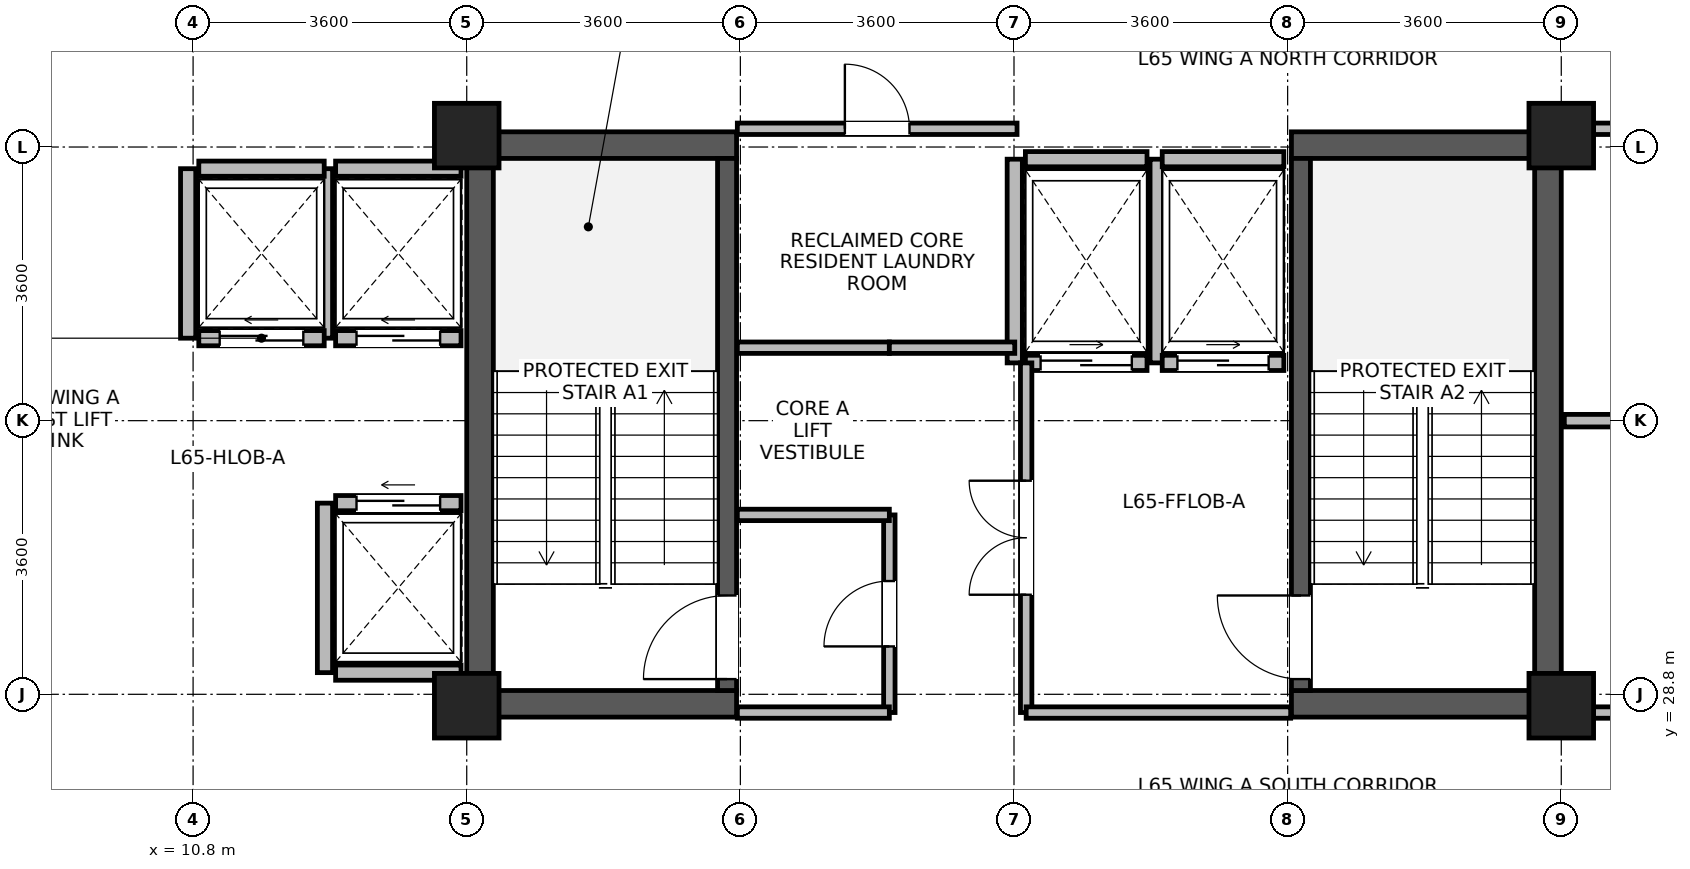
"""IFC4 building model, lengths in metres.
Left out: names, types, materials, properties, quantities, classifications, styles, units other than length and angle.
Written with IfcOpenShell. Run it as: python <this file> out.ifc"""

import sys

from ifc_helpers import new_model, si_unit, direction, frame, frame_2d, origin, origin_2d, place, context, subcontext, project, spatial, rectangle, extrude, source, transform, mapped, element, fill, save


model = new_model("IFC4")
c1 = context("Model", 3, precision=1e-05, world=origin(), true_north=direction((0.0, 1.0)))
c2 = subcontext(c1, "Body", "Model", "MODEL_VIEW")
j1 = project(units=[si_unit("LENGTHUNIT", "METRE"), si_unit("PLANEANGLEUNIT", "RADIAN")], contexts=[c1])
p1 = place(None, origin())
s1 = spatial("IfcSite", under=j1, at=p1, CompositionType="ELEMENT")
p2 = place(p1, origin())
s2 = spatial("IfcBuilding", under=s1, at=p2, CompositionType="ELEMENT")
p3 = place(p2, frame((0.0, 0.0, 253.6)))
s3 = spatial("IfcBuildingStorey", under=s2, at=p3, CompositionType="ELEMENT", Elevation=253.6)
for number, where, z_axis, x_axis in (
    (1, (14.575, 28.5, 0.0), (0.0, 0.0, 1.0), (0.0, 1.0, 0.0)),
    (2, (28.625, 28.5, 0.0), (0.0, 0.0, 1.0), (0.0, 1.0, 0.0)),
):
    element("IfcWall", number, at=place(p3, frame(where, z_axis=z_axis, x_axis=x_axis)), inside=s3, PredefinedType="SHEAR", context=c2, shape_type="SweptSolid", body=[
        extrude(rectangle(XDim=7.7, YDim=0.35, at=frame_2d((3.85, 0.0))), origin(), (0.0, 0.0, 1.0), 3.475),
    ])
for number, where, z_axis, x_axis in (
    (3, (14.75, 28.675, 0.0), (0.0, 0.0, 1.0), (1.0, 0.0, 0.0)),
    (4, (25.25, 28.675, 0.0), (0.0, 0.0, 1.0), (1.0, 0.0, 0.0)),
    (5, (14.75, 36.025, 0.0), (0.0, 0.0, 1.0), (1.0, 0.0, 0.0)),
    (6, (25.25, 36.025, 0.0), (0.0, 0.0, 1.0), (1.0, 0.0, 0.0)),
):
    element("IfcWall", number, at=place(p3, frame(where, z_axis=z_axis, x_axis=x_axis)), inside=s3, PredefinedType="SHEAR", context=c2, shape_type="SweptSolid", body=[
        extrude(rectangle(XDim=3.2, YDim=0.35, at=frame_2d((1.6, 0.0))), origin(), (0.0, 0.0, 1.0), 3.475),
    ])
p4 = place(p3, frame((17.825, 28.85, 0.0), z_axis=(0.0, 0.0, 1.0), x_axis=(0.0, 1.0, 0.0)))
e7 = element("IfcWall", 7, at=p4, inside=s3, PredefinedType="SHEAR", context=c2, shape_type="SweptSolid", body=[
    extrude(rectangle(XDim=7.0, YDim=0.25, at=frame_2d((3.5, 0.0))), origin(), (0.0, 0.0, 1.0), 3.475),
])
p5 = place(p4, frame((0.15, 0.0, 0.0)))
e8 = element("IfcOpeningElement", 8, at=p5, cuts=e7, PredefinedType="OPENING", context=c2, shape_type="SweptSolid", body=[
    extrude(rectangle(XDim=1.1, YDim=2.08, at=frame_2d((0.55, 1.04))), frame((0.0, 0.135, 0.0), z_axis=(0.0, -1.0, 0.0), x_axis=(1.0, 0.0, 0.0)), (0.0, 0.0, 1.0), 0.27),
])
p6 = place(p3, frame((25.375, 28.85, 0.0), z_axis=(0.0, 0.0, 1.0), x_axis=(0.0, 1.0, 0.0)))
e9 = element("IfcWall", 9, at=p6, inside=s3, PredefinedType="SHEAR", context=c2, shape_type="SweptSolid", body=[
    extrude(rectangle(XDim=7.0, YDim=0.25, at=frame_2d((3.5, 0.0))), origin(), (0.0, 0.0, 1.0), 3.475),
])
p7 = place(p6, frame((0.15, 0.0, 0.0)))
e10 = element("IfcOpeningElement", 10, at=p7, cuts=e9, PredefinedType="OPENING", context=c2, shape_type="SweptSolid", body=[
    extrude(rectangle(XDim=1.1, YDim=2.08, at=frame_2d((0.55, 1.04))), frame((0.0, 0.135, 0.0), z_axis=(0.0, -1.0, 0.0), x_axis=(1.0, 0.0, 0.0)), (0.0, 0.0, 1.0), 0.27),
])
m1 = source(origin(), c2, "Body", "SweptSolid", [
    extrude(rectangle(XDim=0.85, YDim=0.85, at=origin_2d()), origin(), (0.0, 0.0, 1.0), 3.7),
])
for number, where, z_axis, x_axis in (
    (11, (14.4, 28.65, 0.0), (0.0, 0.0, 1.0), (1.0, 0.0, 0.0)),
    (12, (14.4, 36.15, 0.0), (0.0, 0.0, 1.0), (1.0, 0.0, 0.0)),
    (13, (28.8, 28.65, 0.0), (0.0, 0.0, 1.0), (1.0, 0.0, 0.0)),
    (14, (28.8, 36.15, 0.0), (0.0, 0.0, 1.0), (1.0, 0.0, 0.0)),
):
    element("IfcColumn", number, at=place(p3, frame(where, z_axis=z_axis, x_axis=x_axis)), inside=s3, PredefinedType="COLUMN", context=c2, shape_type="MappedRepresentation", body=[
        mapped(m1, transform((0.0, 0.0, 0.0), x_axis=(1.0, 0.0, 0.0), y_axis=(0.0, 1.0, 0.0), z_axis=(0.0, 0.0, 1.0), scale=1.0)),
    ])
p8 = place(p3, frame((12.675, 33.485, 0.0), z_axis=(0.0, 0.0, 1.0), x_axis=(1.0, 0.0, 0.0)))
e15 = element("IfcWall", 15, at=p8, inside=s3, PredefinedType="PARTITIONING", context=c2, shape_type="SweptSolid", body=[
    extrude(rectangle(XDim=1.65, YDim=0.2, at=frame_2d((0.825, 0.0))), origin(), (0.0, 0.0, 1.0), 3.455),
])
p9 = place(p8, frame((0.275, 0.0, 0.0)))
e16 = element("IfcOpeningElement", 16, at=p9, cuts=e15, PredefinedType="OPENING", context=c2, shape_type="SweptSolid", body=[
    extrude(rectangle(XDim=1.1, YDim=2.12, at=frame_2d((0.55, 1.06))), frame((0.0, 0.11, 0.0), z_axis=(0.0, -1.0, 0.0), x_axis=(1.0, 0.0, 0.0)), (0.0, 0.0, 1.0), 0.22),
])
p10 = place(p3, frame((12.675, 35.715, 0.0), z_axis=(0.0, 0.0, 1.0), x_axis=(1.0, 0.0, 0.0)))
e17 = element("IfcWall", 17, at=p10, inside=s3, PredefinedType="PARTITIONING", context=c2, shape_type="SweptSolid", body=[
    extrude(rectangle(XDim=1.65, YDim=0.2, at=frame_2d((0.825, 0.0))), origin(), (0.0, 0.0, 1.0), 3.455),
])
p11 = place(p3, frame((12.535, 33.485, 0.0), z_axis=(0.0, 0.0, 1.0), x_axis=(0.0, 1.0, 0.0)))
e18 = element("IfcWall", 18, at=p11, inside=s3, PredefinedType="PARTITIONING", context=c2, shape_type="SweptSolid", body=[
    extrude(rectangle(XDim=2.23, YDim=0.2, at=frame_2d((1.115, 0.0))), origin(), (0.0, 0.0, 1.0), 3.455),
])
p12 = place(p3, frame((12.675, 29.085, 0.0), z_axis=(0.0, 0.0, 1.0), x_axis=(1.0, 0.0, 0.0)))
e19 = element("IfcWall", 19, at=p12, inside=s3, PredefinedType="PARTITIONING", context=c2, shape_type="SweptSolid", body=[
    extrude(rectangle(XDim=1.65, YDim=0.2, at=frame_2d((0.825, 0.0))), origin(), (0.0, 0.0, 1.0), 3.455),
])
p13 = place(p3, frame((12.675, 31.315, 0.0), z_axis=(0.0, 0.0, 1.0), x_axis=(1.0, 0.0, 0.0)))
e20 = element("IfcWall", 20, at=p13, inside=s3, PredefinedType="PARTITIONING", context=c2, shape_type="SweptSolid", body=[
    extrude(rectangle(XDim=1.65, YDim=0.2, at=frame_2d((0.825, 0.0))), origin(), (0.0, 0.0, 1.0), 3.455),
])
p14 = place(p13, frame((0.275, 0.0, 0.0)))
e21 = element("IfcOpeningElement", 21, at=p14, cuts=e20, PredefinedType="OPENING", context=c2, shape_type="SweptSolid", body=[
    extrude(rectangle(XDim=1.1, YDim=2.12, at=frame_2d((0.55, 1.06))), frame((0.0, 0.11, 0.0), z_axis=(0.0, -1.0, 0.0), x_axis=(1.0, 0.0, 0.0)), (0.0, 0.0, 1.0), 0.22),
])
p15 = place(p3, frame((12.535, 29.085, 0.0), z_axis=(0.0, 0.0, 1.0), x_axis=(0.0, 1.0, 0.0)))
e22 = element("IfcWall", 22, at=p15, inside=s3, PredefinedType="PARTITIONING", context=c2, shape_type="SweptSolid", body=[
    extrude(rectangle(XDim=2.23, YDim=0.2, at=frame_2d((1.115, 0.0))), origin(), (0.0, 0.0, 1.0), 3.455),
])
p16 = place(p3, frame((10.875, 33.485, 0.0), z_axis=(0.0, 0.0, 1.0), x_axis=(1.0, 0.0, 0.0)))
e23 = element("IfcWall", 23, at=p16, inside=s3, PredefinedType="PARTITIONING", context=c2, shape_type="SweptSolid", body=[
    extrude(rectangle(XDim=1.65, YDim=0.2, at=frame_2d((0.825, 0.0))), origin(), (0.0, 0.0, 1.0), 3.455),
])
p17 = place(p16, frame((0.275, 0.0, 0.0)))
e24 = element("IfcOpeningElement", 24, at=p17, cuts=e23, PredefinedType="OPENING", context=c2, shape_type="SweptSolid", body=[
    extrude(rectangle(XDim=1.1, YDim=2.12, at=frame_2d((0.55, 1.06))), frame((0.0, 0.11, 0.0), z_axis=(0.0, -1.0, 0.0), x_axis=(1.0, 0.0, 0.0)), (0.0, 0.0, 1.0), 0.22),
])
p18 = place(p3, frame((10.875, 35.715, 0.0), z_axis=(0.0, 0.0, 1.0), x_axis=(1.0, 0.0, 0.0)))
e25 = element("IfcWall", 25, at=p18, inside=s3, PredefinedType="PARTITIONING", context=c2, shape_type="SweptSolid", body=[
    extrude(rectangle(XDim=1.65, YDim=0.2, at=frame_2d((0.825, 0.0))), origin(), (0.0, 0.0, 1.0), 3.455),
])
p19 = place(p3, frame((10.735, 33.485, 0.0), z_axis=(0.0, 0.0, 1.0), x_axis=(0.0, 1.0, 0.0)))
e26 = element("IfcWall", 26, at=p19, inside=s3, PredefinedType="PARTITIONING", context=c2, shape_type="SweptSolid", body=[
    extrude(rectangle(XDim=2.23, YDim=0.2, at=frame_2d((1.115, 0.0))), origin(), (0.0, 0.0, 1.0), 3.455),
])
p20 = place(p3, frame((21.75, 33.16, 0.0), z_axis=(0.0, 0.0, 1.0), x_axis=(1.0, 0.0, 0.0)))
e27 = element("IfcWall", 27, at=p20, inside=s3, PredefinedType="PARTITIONING", context=c2, shape_type="SweptSolid", body=[
    extrude(rectangle(XDim=1.6, YDim=0.2, at=frame_2d((0.8, 0.0))), origin(), (0.0, 0.0, 1.0), 3.455),
])
p21 = place(p20, frame((0.2, 0.0, 0.0)))
e28 = element("IfcOpeningElement", 28, at=p21, cuts=e27, PredefinedType="OPENING", context=c2, shape_type="SweptSolid", body=[
    extrude(rectangle(XDim=1.2, YDim=2.12, at=frame_2d((0.6, 1.06))), frame((0.0, 0.11, 0.0), z_axis=(0.0, -1.0, 0.0), x_axis=(1.0, 0.0, 0.0)), (0.0, 0.0, 1.0), 0.22),
])
p22 = place(p3, frame((21.75, 35.84, 0.0), z_axis=(0.0, 0.0, 1.0), x_axis=(1.0, 0.0, 0.0)))
e29 = element("IfcWall", 29, at=p22, inside=s3, PredefinedType="PARTITIONING", context=c2, shape_type="SweptSolid", body=[
    extrude(rectangle(XDim=1.6, YDim=0.2, at=frame_2d((0.8, 0.0))), origin(), (0.0, 0.0, 1.0), 2.555),
])
for number, where, z_axis, x_axis in (
    (30, (21.61, 33.16, 0.0), (0.0, 0.0, 1.0), (0.0, 1.0, 0.0)),
    (31, (23.49, 33.16, 0.0), (0.0, 0.0, 1.0), (0.0, 1.0, 0.0)),
):
    element("IfcWall", number, at=place(p3, frame(where, z_axis=z_axis, x_axis=x_axis)), inside=s3, PredefinedType="PARTITIONING", context=c2, shape_type="SweptSolid", body=[
        extrude(rectangle(XDim=2.68, YDim=0.2, at=frame_2d((1.34, 0.0))), origin(), (0.0, 0.0, 1.0), 3.455),
    ])
p23 = place(p3, frame((23.55, 33.16, 0.0), z_axis=(0.0, 0.0, 1.0), x_axis=(1.0, 0.0, 0.0)))
e32 = element("IfcWall", 32, at=p23, inside=s3, PredefinedType="PARTITIONING", context=c2, shape_type="SweptSolid", body=[
    extrude(rectangle(XDim=1.6, YDim=0.2, at=frame_2d((0.8, 0.0))), origin(), (0.0, 0.0, 1.0), 3.455),
])
p24 = place(p23, frame((0.2, 0.0, 0.0)))
e33 = element("IfcOpeningElement", 33, at=p24, cuts=e32, PredefinedType="OPENING", context=c2, shape_type="SweptSolid", body=[
    extrude(rectangle(XDim=1.2, YDim=2.12, at=frame_2d((0.6, 1.06))), frame((0.0, 0.11, 0.0), z_axis=(0.0, -1.0, 0.0), x_axis=(1.0, 0.0, 0.0)), (0.0, 0.0, 1.0), 0.22),
])
p25 = place(p3, frame((23.55, 35.84, 0.0), z_axis=(0.0, 0.0, 1.0), x_axis=(1.0, 0.0, 0.0)))
e34 = element("IfcWall", 34, at=p25, inside=s3, PredefinedType="PARTITIONING", context=c2, shape_type="SweptSolid", body=[
    extrude(rectangle(XDim=1.6, YDim=0.2, at=frame_2d((0.8, 0.0))), origin(), (0.0, 0.0, 1.0), 2.555),
])
p26 = place(p3, frame((29.225, 28.56, 0.0), z_axis=(0.0, 0.0, 1.0), x_axis=(1.0, 0.0, 0.0)))
e35 = element("IfcWall", 35, at=p26, inside=s3, PredefinedType="PARTITIONING", context=c2, shape_type="SweptSolid", body=[
    extrude(rectangle(XDim=4.135, YDim=0.15, at=frame_2d((2.067, 0.0))), origin(), (0.0, 0.0, 1.0), 2.905),
])
p27 = place(p26, frame((1.637, 0.0, 0.0)))
e36 = element("IfcOpeningElement", 36, at=p27, cuts=e35, PredefinedType="OPENING", context=c2, shape_type="SweptSolid", body=[
    extrude(rectangle(XDim=0.86, YDim=2.02, at=frame_2d((0.43, 1.01))), frame((0.0, 0.085, 0.0), z_axis=(0.0, -1.0, 0.0), x_axis=(1.0, 0.0, 0.0)), (0.0, 0.0, 1.0), 0.17),
])
p28 = place(p3, frame((29.225, 36.24, 0.0), z_axis=(0.0, 0.0, 1.0), x_axis=(1.0, 0.0, 0.0)))
e37 = element("IfcWall", 37, at=p28, inside=s3, PredefinedType="PARTITIONING", context=c2, shape_type="SweptSolid", body=[
    extrude(rectangle(XDim=4.135, YDim=0.15, at=frame_2d((2.067, 0.0))), origin(), (0.0, 0.0, 1.0), 2.905),
])
p29 = place(p28, frame((1.417, 0.0, 0.0)))
e38 = element("IfcOpeningElement", 38, at=p29, cuts=e37, PredefinedType="OPENING", context=c2, shape_type="SweptSolid", body=[
    extrude(rectangle(XDim=1.3, YDim=2.12, at=frame_2d((0.65, 1.06))), frame((0.0, 0.085, 0.0), z_axis=(0.0, -1.0, 0.0), x_axis=(1.0, 0.0, 0.0)), (0.0, 0.0, 1.0), 0.17),
])
p30 = place(p3, frame((17.96, 36.24, 0.0), z_axis=(0.0, 0.0, 1.0), x_axis=(1.0, 0.0, 0.0)))
e39 = element("IfcWall", 39, at=p30, inside=s3, PredefinedType="PARTITIONING", context=c2, shape_type="SweptSolid", body=[
    extrude(rectangle(XDim=3.68, YDim=0.15, at=frame_2d((1.84, 0.0))), origin(), (0.0, 0.0, 1.0), 2.555),
])
p31 = place(p30, frame((1.415, 0.0, 0.0)))
e40 = element("IfcOpeningElement", 40, at=p31, cuts=e39, PredefinedType="OPENING", context=c2, shape_type="SweptSolid", body=[
    extrude(rectangle(XDim=0.85, YDim=2.04, at=frame_2d((0.425, 1.02))), frame((0.0, 0.085, 0.0), z_axis=(0.0, -1.0, 0.0), x_axis=(1.0, 0.0, 0.0)), (0.0, 0.0, 1.0), 0.17),
])
p32 = place(p3, frame((19.96, 28.56, 0.0), z_axis=(0.0, 0.0, 1.0), x_axis=(0.0, 1.0, 0.0)))
e41 = element("IfcWall", 41, at=p32, inside=s3, PredefinedType="PARTITIONING", context=c2, shape_type="SweptSolid", body=[
    extrude(rectangle(XDim=2.6, YDim=0.15, at=frame_2d((1.3, 0.0))), origin(), (0.0, 0.0, 1.0), 3.455),
])
p33 = place(p32, frame((0.87, 0.0, 0.0)))
e42 = element("IfcOpeningElement", 42, at=p33, cuts=e41, PredefinedType="OPENING", context=c2, shape_type="SweptSolid", body=[
    extrude(rectangle(XDim=0.86, YDim=2.02, at=frame_2d((0.43, 1.01))), frame((0.0, 0.085, 0.0), z_axis=(0.0, -1.0, 0.0), x_axis=(1.0, 0.0, 0.0)), (0.0, 0.0, 1.0), 0.17),
])
p34 = place(p3, frame((17.96, 28.56, 0.0), z_axis=(0.0, 0.0, 1.0), x_axis=(1.0, 0.0, 0.0)))
e43 = element("IfcWall", 43, at=p34, inside=s3, PredefinedType="PARTITIONING", context=c2, shape_type="SweptSolid", body=[
    extrude(rectangle(XDim=2.0, YDim=0.15, at=frame_2d((1.0, 0.0))), origin(), (0.0, 0.0, 1.0), 2.555),
])
for number, where, z_axis, x_axis in (
    (44, (17.96, 31.16, 0.0), (0.0, 0.0, 1.0), (1.0, 0.0, 0.0)),
    (45, (17.96, 33.36, 0.0), (0.0, 0.0, 1.0), (1.0, 0.0, 0.0)),
):
    element("IfcWall", number, at=place(p3, frame(where, z_axis=z_axis, x_axis=x_axis)), inside=s3, PredefinedType="PARTITIONING", context=c2, shape_type="SweptSolid", body=[
        extrude(rectangle(XDim=2.0, YDim=0.15, at=frame_2d((1.0, 0.0))), origin(), (0.0, 0.0, 1.0), 3.455),
    ])
p35 = place(p3, frame((19.96, 33.36, 0.0), z_axis=(0.0, 0.0, 1.0), x_axis=(1.0, 0.0, 0.0)))
e46 = element("IfcWall", 46, at=p35, inside=s3, PredefinedType="PARTITIONING", context=c2, shape_type="SweptSolid", body=[
    extrude(rectangle(XDim=1.65, YDim=0.15, at=frame_2d((0.825, 0.0))), origin(), (0.0, 0.0, 1.0), 3.455),
])
p36 = place(p3, frame((21.76, 28.56, 0.0), z_axis=(0.0, 0.0, 1.0), x_axis=(0.0, 1.0, 0.0)))
e47 = element("IfcWall", 47, at=p36, inside=s3, PredefinedType="PARTITIONING", context=c2, shape_type="SweptSolid", body=[
    extrude(rectangle(XDim=4.6, YDim=0.15, at=frame_2d((2.3, 0.0))), origin(), (0.0, 0.0, 1.0), 3.455),
])
p37 = place(p36, frame((1.55, 0.0, 0.0)))
e48 = element("IfcOpeningElement", 48, at=p37, cuts=e47, PredefinedType="OPENING", context=c2, shape_type="SweptSolid", body=[
    extrude(rectangle(XDim=1.5, YDim=2.1, at=frame_2d((0.75, 1.05))), frame((0.0, 0.085, 0.0), z_axis=(0.0, -1.0, 0.0), x_axis=(1.0, 0.0, 0.0)), (0.0, 0.0, 1.0), 0.17),
])
p38 = place(p3, frame((28.84, 32.4, 0.0), z_axis=(0.0, 0.0, 1.0), x_axis=(1.0, 0.0, 0.0)))
e49 = element("IfcWall", 49, at=p38, inside=s3, PredefinedType="PARTITIONING", context=c2, shape_type="SweptSolid", body=[
    extrude(rectangle(XDim=4.52, YDim=0.165, at=frame_2d((2.26, 0.0))), origin(), (0.0, 0.0, 1.0), 3.455),
])
p39 = place(p3, frame((21.76, 28.56, 0.0), z_axis=(0.0, 0.0, 1.0), x_axis=(1.0, 0.0, 0.0)))
e50 = element("IfcWall", 50, at=p39, inside=s3, PredefinedType="PARTITIONING", context=c2, shape_type="SweptSolid", body=[
    extrude(rectangle(XDim=3.48, YDim=0.15, at=frame_2d((1.74, 0.0))), origin(), (0.0, 0.0, 1.0), 2.555),
])
p40 = place(p5, origin())
e51 = element("IfcDoor", 51, at=p40, inside=s3, OperationType="SINGLE_SWING_LEFT", PredefinedType="DOOR", context=c2, shape_type="SweptSolid", body=[
    extrude(rectangle(XDim=1.1, YDim=2.08, at=frame_2d((0.55, 1.04))), frame((0.0, 0.025, 0.0), z_axis=(0.0, -1.0, 0.0), x_axis=(1.0, 0.0, 0.0)), (0.0, 0.0, 1.0), 0.05),
])
fill(e8, e51)
p41 = place(p7, origin())
e52 = element("IfcDoor", 52, at=p41, inside=s3, OperationType="SINGLE_SWING_RIGHT", PredefinedType="DOOR", context=c2, shape_type="SweptSolid", body=[
    extrude(rectangle(XDim=1.1, YDim=2.08, at=frame_2d((0.55, 1.04))), frame((0.0, 0.025, 0.0), z_axis=(0.0, -1.0, 0.0), x_axis=(1.0, 0.0, 0.0)), (0.0, 0.0, 1.0), 0.05),
])
fill(e10, e52)
p42 = place(p9, origin())
e53 = element("IfcDoor", 53, at=p42, inside=s3, OperationType="SLIDING_TO_LEFT", PredefinedType="DOOR", context=c2, shape_type="SweptSolid", body=[
    extrude(rectangle(XDim=1.1, YDim=2.12, at=frame_2d((0.55, 1.06))), frame((0.0, 0.025, 0.0), z_axis=(0.0, -1.0, 0.0), x_axis=(1.0, 0.0, 0.0)), (0.0, 0.0, 1.0), 0.05),
])
fill(e16, e53)
p43 = place(p14, origin())
e54 = element("IfcDoor", 54, at=p43, inside=s3, OperationType="SLIDING_TO_LEFT", PredefinedType="DOOR", context=c2, shape_type="SweptSolid", body=[
    extrude(rectangle(XDim=1.1, YDim=2.12, at=frame_2d((0.55, 1.06))), frame((0.0, 0.025, 0.0), z_axis=(0.0, -1.0, 0.0), x_axis=(1.0, 0.0, 0.0)), (0.0, 0.0, 1.0), 0.05),
])
fill(e21, e54)
p44 = place(p17, origin())
e55 = element("IfcDoor", 55, at=p44, inside=s3, OperationType="SLIDING_TO_LEFT", PredefinedType="DOOR", context=c2, shape_type="SweptSolid", body=[
    extrude(rectangle(XDim=1.1, YDim=2.12, at=frame_2d((0.55, 1.06))), frame((0.0, 0.025, 0.0), z_axis=(0.0, -1.0, 0.0), x_axis=(1.0, 0.0, 0.0)), (0.0, 0.0, 1.0), 0.05),
])
fill(e24, e55)
p45 = place(p21, origin())
e56 = element("IfcDoor", 56, at=p45, inside=s3, OperationType="SLIDING_TO_RIGHT", PredefinedType="DOOR", context=c2, shape_type="SweptSolid", body=[
    extrude(rectangle(XDim=1.2, YDim=2.12, at=frame_2d((0.6, 1.06))), frame((0.0, 0.025, 0.0), z_axis=(0.0, -1.0, 0.0), x_axis=(1.0, 0.0, 0.0)), (0.0, 0.0, 1.0), 0.05),
])
fill(e28, e56)
p46 = place(p24, origin())
e57 = element("IfcDoor", 57, at=p46, inside=s3, OperationType="SLIDING_TO_RIGHT", PredefinedType="DOOR", context=c2, shape_type="SweptSolid", body=[
    extrude(rectangle(XDim=1.2, YDim=2.12, at=frame_2d((0.6, 1.06))), frame((0.0, 0.025, 0.0), z_axis=(0.0, -1.0, 0.0), x_axis=(1.0, 0.0, 0.0)), (0.0, 0.0, 1.0), 0.05),
])
fill(e33, e57)
p47 = place(p31, origin())
e58 = element("IfcDoor", 58, at=p47, inside=s3, OperationType="SINGLE_SWING_LEFT", PredefinedType="DOOR", context=c2, shape_type="SweptSolid", body=[
    extrude(rectangle(XDim=0.85, YDim=2.04, at=frame_2d((0.425, 1.02))), frame((0.0, 0.025, 0.0), z_axis=(0.0, -1.0, 0.0), x_axis=(1.0, 0.0, 0.0)), (0.0, 0.0, 1.0), 0.05),
])
fill(e40, e58)
p48 = place(p33, origin())
e59 = element("IfcDoor", 59, at=p48, inside=s3, OperationType="SINGLE_SWING_LEFT", PredefinedType="DOOR", context=c2, shape_type="SweptSolid", body=[
    extrude(rectangle(XDim=0.86, YDim=2.02, at=frame_2d((0.43, 1.01))), frame((0.0, 0.025, 0.0), z_axis=(0.0, -1.0, 0.0), x_axis=(1.0, 0.0, 0.0)), (0.0, 0.0, 1.0), 0.05),
])
fill(e42, e59)
p49 = place(p37, origin())
e60 = element("IfcDoor", 60, at=p49, inside=s3, OperationType="DOUBLE_DOOR_SINGLE_SWING", PredefinedType="DOOR", context=c2, shape_type="SweptSolid", body=[
    extrude(rectangle(XDim=1.5, YDim=2.1, at=frame_2d((0.75, 1.05))), frame((0.0, 0.025, 0.0), z_axis=(0.0, -1.0, 0.0), x_axis=(1.0, 0.0, 0.0)), (0.0, 0.0, 1.0), 0.05),
])
fill(e48, e60)
save(model, sys.argv[1])
